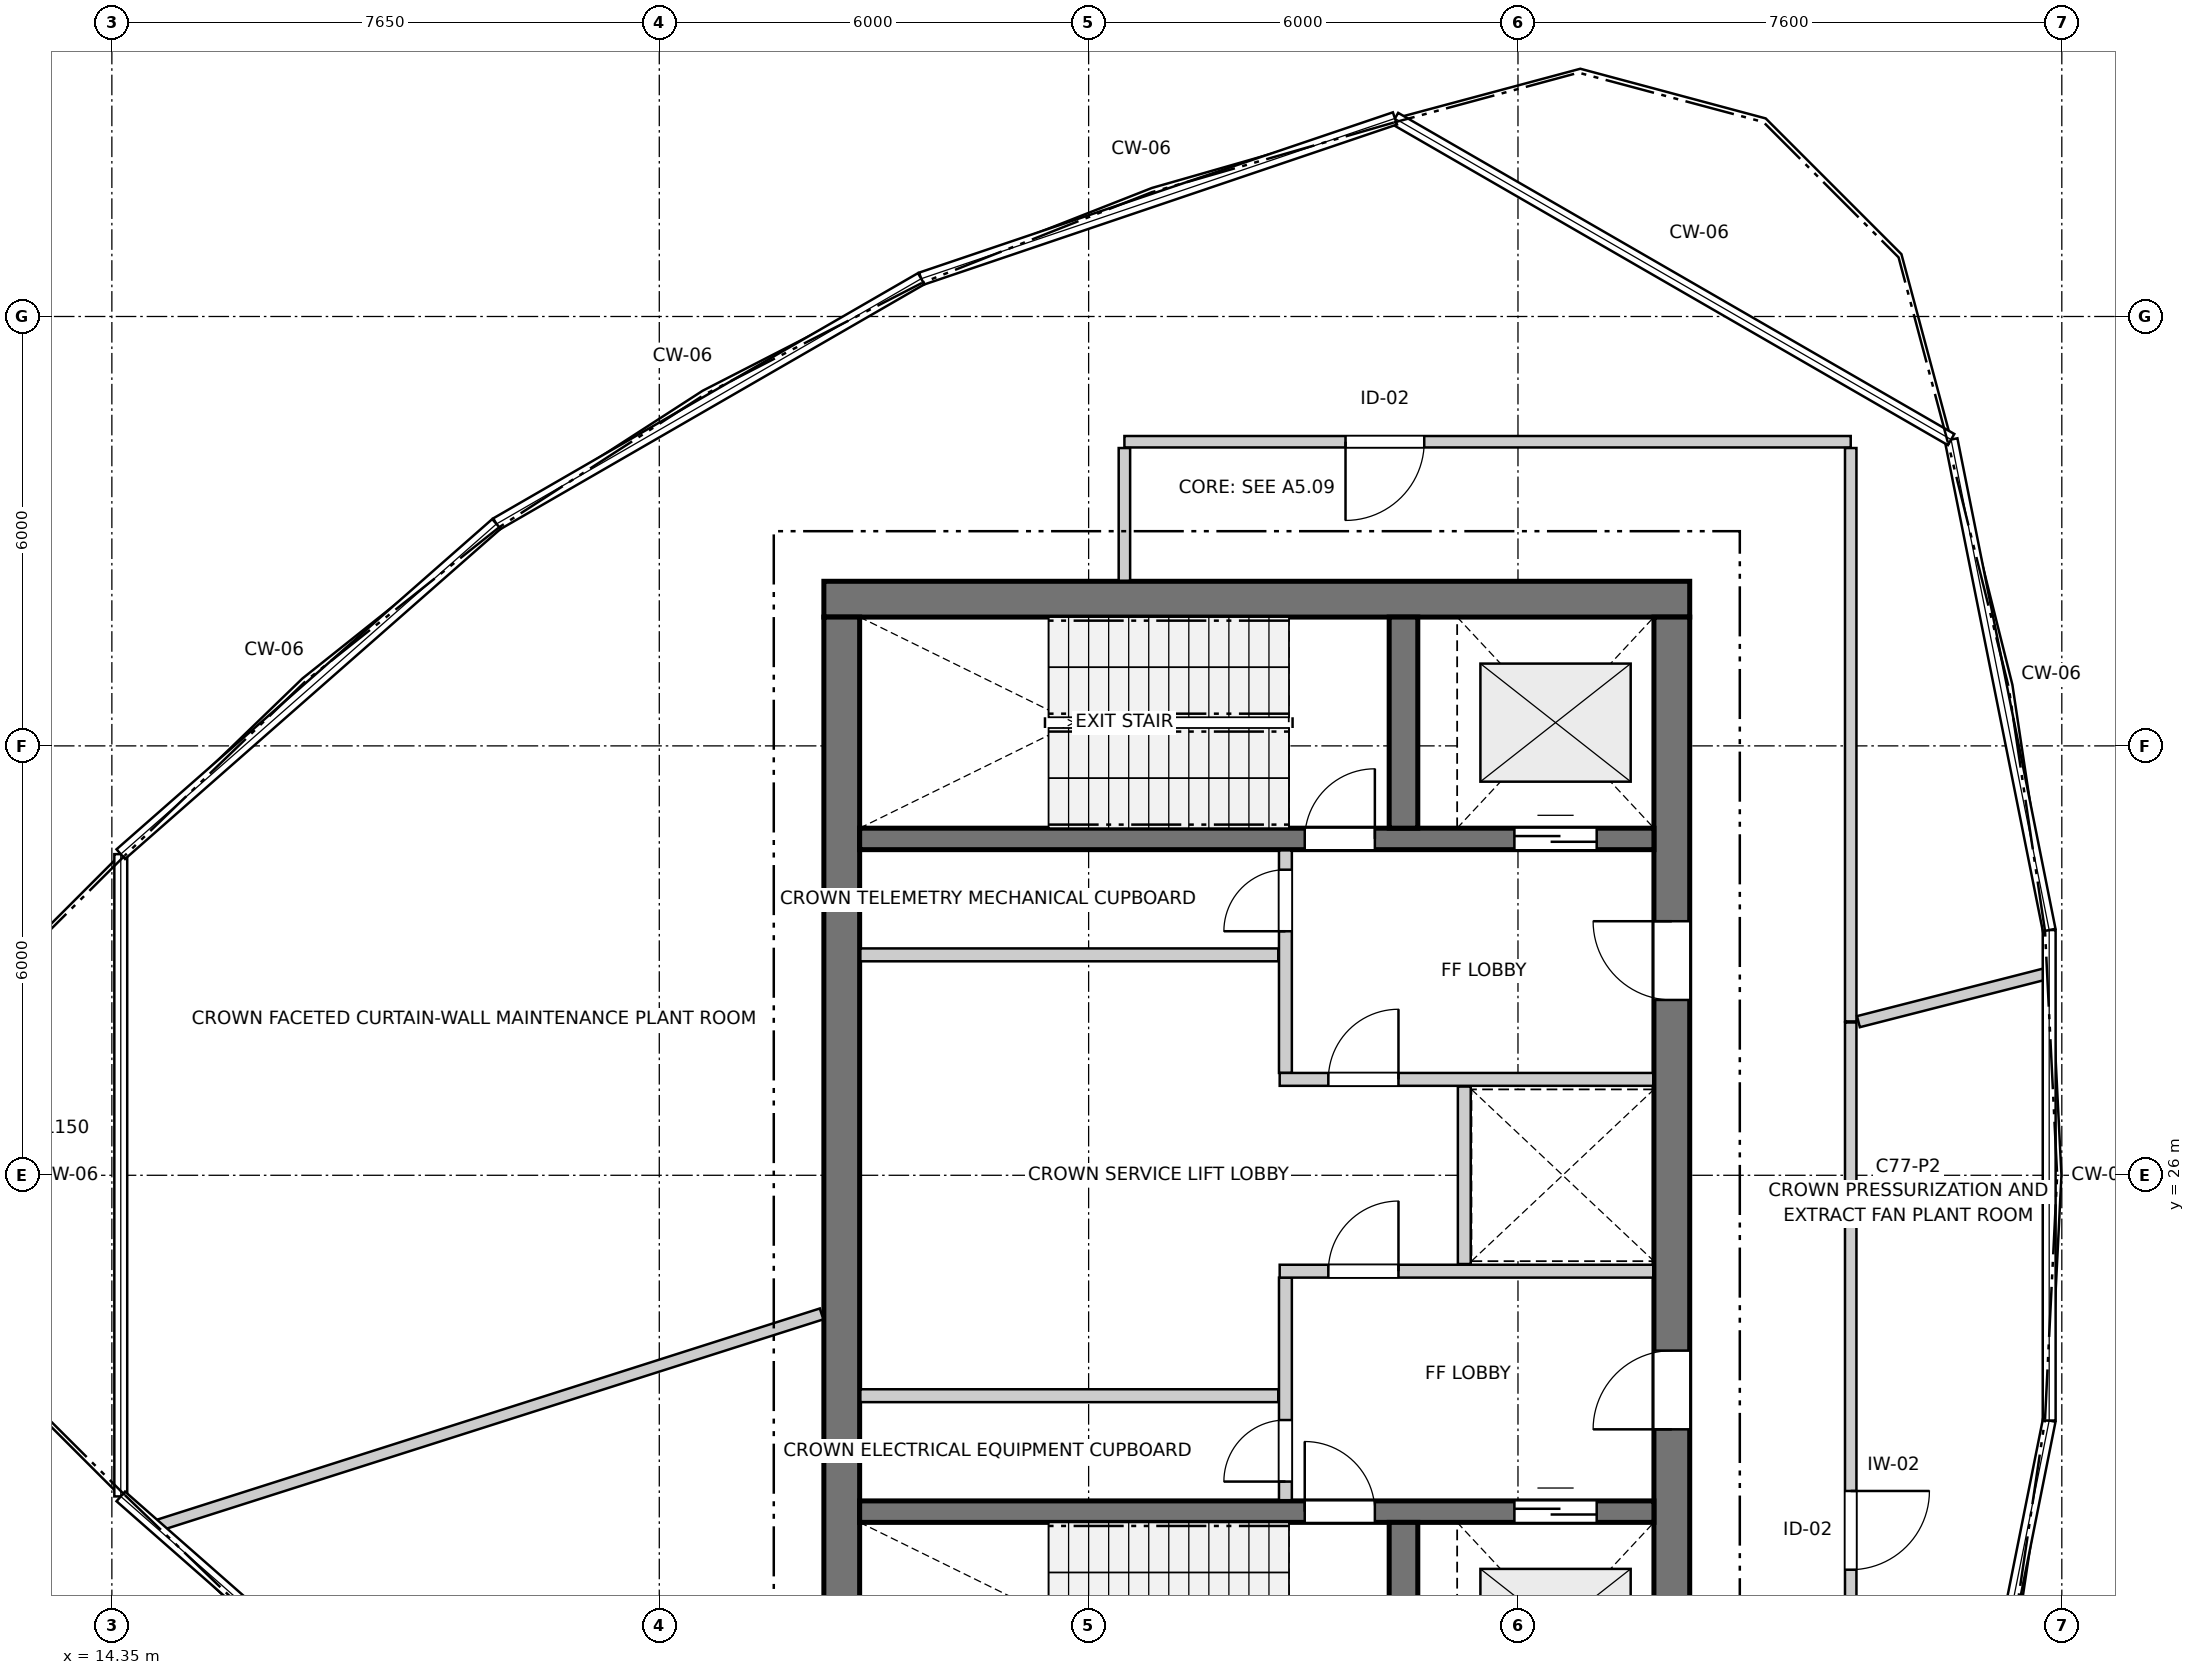
"""IFC4 building model, lengths in metres.
Left out: names, types, materials, properties, quantities, classifications, styles, units other than length and angle.
Written with IfcOpenShell. Run it as: python <this file> out.ifc"""

import sys

from ifc_helpers import new_model, si_unit, direction, frame, frame_2d, origin, place, context, subcontext, project, spatial, rectangle, extrude, source, transform, mapped, element, fill, save


model = new_model("IFC4")
c1 = context("Model", 3, precision=1e-05, world=origin(), true_north=direction((0.0, 1.0)))
c2 = subcontext(c1, "Body", "Model", "MODEL_VIEW")
j1 = project(units=[si_unit("LENGTHUNIT", "METRE"), si_unit("PLANEANGLEUNIT", "RADIAN")], contexts=[c1])
p1 = place(None, origin())
s1 = spatial("IfcSite", under=j1, at=p1, CompositionType="ELEMENT")
p2 = place(p1, origin())
s2 = spatial("IfcBuilding", under=s1, at=p2, CompositionType="ELEMENT")
p3 = place(p2, frame((0.0, 0.0, 257.5)))
s3 = spatial("IfcBuildingStorey", under=s2, at=p3, CompositionType="ELEMENT", Elevation=257.5)
p4 = place(p3, frame((36.4, 34.05, 0.0), z_axis=(0.0, 0.0, 1.0), x_axis=(-1.0, 0.0, 0.0)))
e1 = element("IfcWall", 1, at=p4, inside=s3, PredefinedType="SHEAR", context=c2, shape_type="SweptSolid", body=[
    extrude(rectangle(XDim=12.1, YDim=0.5, at=frame_2d((6.05, 0.0))), origin(), (0.0, 0.0, 1.0), 4.05),
])
p5 = place(p3, frame((24.55, 33.8, 0.0), z_axis=(0.0, 0.0, 1.0), x_axis=(0.0, -1.0, 0.0)))
e2 = element("IfcWall", 2, at=p5, inside=s3, PredefinedType="SHEAR", context=c2, shape_type="SweptSolid", body=[
    extrude(rectangle(XDim=15.6, YDim=0.5, at=frame_2d((7.8, 0.0))), origin(), (0.0, 0.0, 1.0), 4.05),
])
p6 = place(p3, frame((36.15, 18.2, 0.0), z_axis=(0.0, 0.0, 1.0), x_axis=(0.0, 1.0, 0.0)))
e3 = element("IfcWall", 3, at=p6, inside=s3, PredefinedType="SHEAR", context=c2, shape_type="SweptSolid", body=[
    extrude(rectangle(XDim=15.6, YDim=0.5, at=frame_2d((7.8, 0.0))), origin(), (0.0, 0.0, 1.0), 4.05),
])
p7 = place(p6, frame((4.25, 0.0, 0.0)))
e4 = element("IfcOpeningElement", 4, at=p7, cuts=e3, PredefinedType="OPENING", context=c2, shape_type="SweptSolid", body=[
    extrude(rectangle(XDim=1.1, YDim=2.15, at=frame_2d((0.55, 1.075))), frame((0.0, 0.26, 0.0), z_axis=(0.0, -1.0, 0.0), x_axis=(1.0, 0.0, 0.0)), (0.0, 0.0, 1.0), 0.52),
])
p8 = place(p6, frame((10.25, 0.0, 0.0)))
e5 = element("IfcOpeningElement", 5, at=p8, cuts=e3, PredefinedType="OPENING", context=c2, shape_type="SweptSolid", body=[
    extrude(rectangle(XDim=1.1, YDim=2.15, at=frame_2d((0.55, 1.075))), frame((0.0, 0.26, 0.0), z_axis=(0.0, -1.0, 0.0), x_axis=(1.0, 0.0, 0.0)), (0.0, 0.0, 1.0), 0.52),
])
p9 = place(p3, frame((24.8, 21.3, 0.0), z_axis=(0.0, 0.0, 1.0), x_axis=(1.0, 0.0, 0.0)))
e6 = element("IfcWall", 6, at=p9, inside=s3, PredefinedType="SHEAR", context=c2, shape_type="SweptSolid", body=[
    extrude(rectangle(XDim=11.1, YDim=0.3, at=frame_2d((5.55, 0.0))), origin(), (0.0, 0.0, 1.0), 4.05),
])
p10 = place(p9, frame((6.22, 0.0, 0.0)))
e7 = element("IfcOpeningElement", 7, at=p10, cuts=e6, PredefinedType="OPENING", context=c2, shape_type="SweptSolid", body=[
    extrude(rectangle(XDim=0.98, YDim=2.15, at=frame_2d((0.49, 1.075))), frame((0.0, 0.16, 0.0), z_axis=(0.0, -1.0, 0.0), x_axis=(1.0, 0.0, 0.0)), (0.0, 0.0, 1.0), 0.32),
])
p11 = place(p9, frame((9.15, 0.0, 0.0)))
e8 = element("IfcOpeningElement", 8, at=p11, cuts=e6, PredefinedType="OPENING", context=c2, shape_type="SweptSolid", body=[
    extrude(rectangle(XDim=1.15, YDim=2.15, at=frame_2d((0.575, 1.075))), frame((0.0, 0.16, 0.0), z_axis=(0.0, -1.0, 0.0), x_axis=(1.0, 0.0, 0.0)), (0.0, 0.0, 1.0), 0.32),
])
p12 = place(p3, frame((32.4, 18.2, 0.0), z_axis=(0.0, 0.0, 1.0), x_axis=(0.0, 1.0, 0.0)))
e9 = element("IfcWall", 9, at=p12, inside=s3, PredefinedType="SHEAR", context=c2, shape_type="SweptSolid", body=[
    extrude(rectangle(XDim=2.95, YDim=0.4, at=frame_2d((1.475, 0.0))), origin(), (0.0, 0.0, 1.0), 4.05),
])
p13 = place(p3, frame((24.8, 30.7, 0.0), z_axis=(0.0, 0.0, 1.0), x_axis=(1.0, 0.0, 0.0)))
e10 = element("IfcWall", 10, at=p13, inside=s3, PredefinedType="SHEAR", context=c2, shape_type="SweptSolid", body=[
    extrude(rectangle(XDim=11.1, YDim=0.3, at=frame_2d((5.55, 0.0))), origin(), (0.0, 0.0, 1.0), 4.05),
])
p14 = place(p13, frame((6.22, 0.0, 0.0)))
e11 = element("IfcOpeningElement", 11, at=p14, cuts=e10, PredefinedType="OPENING", context=c2, shape_type="SweptSolid", body=[
    extrude(rectangle(XDim=0.98, YDim=2.15, at=frame_2d((0.49, 1.075))), frame((0.0, 0.16, 0.0), z_axis=(0.0, -1.0, 0.0), x_axis=(1.0, 0.0, 0.0)), (0.0, 0.0, 1.0), 0.32),
])
p15 = place(p13, frame((9.15, 0.0, 0.0)))
e12 = element("IfcOpeningElement", 12, at=p15, cuts=e10, PredefinedType="OPENING", context=c2, shape_type="SweptSolid", body=[
    extrude(rectangle(XDim=1.15, YDim=2.15, at=frame_2d((0.575, 1.075))), frame((0.0, 0.16, 0.0), z_axis=(0.0, -1.0, 0.0), x_axis=(1.0, 0.0, 0.0)), (0.0, 0.0, 1.0), 0.32),
])
p16 = place(p3, frame((32.4, 30.85, 0.0), z_axis=(0.0, 0.0, 1.0), x_axis=(0.0, 1.0, 0.0)))
e13 = element("IfcWall", 13, at=p16, inside=s3, PredefinedType="SHEAR", context=c2, shape_type="SweptSolid", body=[
    extrude(rectangle(XDim=2.95, YDim=0.4, at=frame_2d((1.475, 0.0))), origin(), (0.0, 0.0, 1.0), 4.05),
])
p17 = place(p3, frame((30.75, 21.46, 0.0), z_axis=(0.0, 0.0, 1.0), x_axis=(0.0, 1.0, 0.0)))
e14 = element("IfcWall", 14, at=p17, inside=s3, PredefinedType="PARTITIONING", context=c2, shape_type="SweptSolid", body=[
    extrude(rectangle(XDim=3.11, YDim=0.18, at=frame_2d((1.555, 0.0))), origin(), (0.0, 0.0, 1.0), 4.05),
])
p18 = place(p17, frame((0.26, 0.0, 0.0)))
e15 = element("IfcOpeningElement", 15, at=p18, cuts=e14, PredefinedType="OPENING", context=c2, shape_type="SweptSolid", body=[
    extrude(rectangle(XDim=0.86, YDim=2.05, at=frame_2d((0.43, 1.025))), frame((0.0, 0.1, 0.0), z_axis=(0.0, -1.0, 0.0), x_axis=(1.0, 0.0, 0.0)), (0.0, 0.0, 1.0), 0.2),
])
p19 = place(p3, frame((30.67, 24.66, 0.0), z_axis=(0.0, 0.0, 1.0), x_axis=(1.0, 0.0, 0.0)))
e16 = element("IfcWall", 16, at=p19, inside=s3, PredefinedType="PARTITIONING", context=c2, shape_type="SweptSolid", body=[
    extrude(rectangle(XDim=5.22, YDim=0.18, at=frame_2d((2.61, 0.0))), origin(), (0.0, 0.0, 1.0), 4.05),
])
p20 = place(p19, frame((0.68, 0.0, 0.0)))
e17 = element("IfcOpeningElement", 17, at=p20, cuts=e16, PredefinedType="OPENING", context=c2, shape_type="SweptSolid", body=[
    extrude(rectangle(XDim=0.98, YDim=2.15, at=frame_2d((0.49, 1.075))), frame((0.0, 0.1, 0.0), z_axis=(0.0, -1.0, 0.0), x_axis=(1.0, 0.0, 0.0)), (0.0, 0.0, 1.0), 0.2),
])
p21 = place(p3, frame((30.75, 27.43, 0.0), z_axis=(0.0, 0.0, 1.0), x_axis=(0.0, 1.0, 0.0)))
e18 = element("IfcWall", 18, at=p21, inside=s3, PredefinedType="PARTITIONING", context=c2, shape_type="SweptSolid", body=[
    extrude(rectangle(XDim=3.11, YDim=0.18, at=frame_2d((1.555, 0.0))), origin(), (0.0, 0.0, 1.0), 4.05),
])
p22 = place(p21, frame((1.98, 0.0, 0.0)))
e19 = element("IfcOpeningElement", 19, at=p22, cuts=e18, PredefinedType="OPENING", context=c2, shape_type="SweptSolid", body=[
    extrude(rectangle(XDim=0.86, YDim=2.05, at=frame_2d((0.43, 1.025))), frame((0.0, 0.1, 0.0), z_axis=(0.0, -1.0, 0.0), x_axis=(1.0, 0.0, 0.0)), (0.0, 0.0, 1.0), 0.2),
])
p23 = place(p3, frame((30.67, 27.34, 0.0), z_axis=(0.0, 0.0, 1.0), x_axis=(1.0, 0.0, 0.0)))
e20 = element("IfcWall", 20, at=p23, inside=s3, PredefinedType="PARTITIONING", context=c2, shape_type="SweptSolid", body=[
    extrude(rectangle(XDim=5.22, YDim=0.18, at=frame_2d((2.61, 0.0))), origin(), (0.0, 0.0, 1.0), 4.05),
])
p24 = place(p23, frame((0.68, 0.0, 0.0)))
e21 = element("IfcOpeningElement", 21, at=p24, cuts=e20, PredefinedType="OPENING", context=c2, shape_type="SweptSolid", body=[
    extrude(rectangle(XDim=0.98, YDim=2.15, at=frame_2d((0.49, 1.075))), frame((0.0, 0.1, 0.0), z_axis=(0.0, -1.0, 0.0), x_axis=(1.0, 0.0, 0.0)), (0.0, 0.0, 1.0), 0.2),
])
p25 = place(p3, frame((33.25, 24.76, 0.0), z_axis=(0.0, 0.0, 1.0), x_axis=(0.0, 1.0, 0.0)))
e22 = element("IfcWall", 22, at=p25, inside=s3, PredefinedType="PARTITIONING", context=c2, shape_type="SweptSolid", body=[
    extrude(rectangle(XDim=2.48, YDim=0.18, at=frame_2d((1.24, 0.0))), origin(), (0.0, 0.0, 1.0), 4.05),
])
for number, where, z_axis, x_axis in (
    (23, (24.81, 22.92, 0.0), (0.0, 0.0, 1.0), (1.0, 0.0, 0.0)),
    (24, (24.81, 29.08, 0.0), (0.0, 0.0, 1.0), (1.0, 0.0, 0.0)),
):
    element("IfcWall", number, at=place(p3, frame(where, z_axis=z_axis, x_axis=x_axis)), inside=s3, PredefinedType="PARTITIONING", context=c2, shape_type="SweptSolid", body=[
        extrude(rectangle(XDim=5.84, YDim=0.18, at=frame_2d((2.92, 0.0))), origin(), (0.0, 0.0, 1.0), 4.05),
    ])
p26 = place(p3, frame((38.65, 28.135, 0.0), z_axis=(0.0, 0.0, 1.0), x_axis=(0.0, -1.0, 0.0)))
e25 = element("IfcWall", 25, at=p26, inside=s3, PredefinedType="PARTITIONING", context=c2, shape_type="SweptSolid", body=[
    extrude(rectangle(XDim=12.385, YDim=0.16, at=frame_2d((6.192, 0.0))), origin(), (0.0, 0.0, 1.0), 4.05),
])
p27 = place(p26, frame((6.546, 0.0, 0.0)))
e26 = element("IfcOpeningElement", 26, at=p27, cuts=e25, PredefinedType="OPENING", context=c2, shape_type="SweptSolid", body=[
    extrude(rectangle(XDim=1.1, YDim=2.15, at=frame_2d((0.55, 1.075))), frame((0.0, 0.09, 0.0), z_axis=(0.0, -1.0, 0.0), x_axis=(1.0, 0.0, 0.0)), (0.0, 0.0, 1.0), 0.18),
])
p28 = place(p3, frame((38.65, 36.25, 0.0), z_axis=(0.0, 0.0, 1.0), x_axis=(-1.0, 0.0, 0.0)))
e27 = element("IfcWall", 27, at=p28, inside=s3, PredefinedType="PARTITIONING", context=c2, shape_type="SweptSolid", body=[
    extrude(rectangle(XDim=10.15, YDim=0.16, at=frame_2d((5.075, 0.0))), origin(), (0.0, 0.0, 1.0), 4.05),
])
p29 = place(p28, frame((5.96, 0.0, 0.0)))
e28 = element("IfcOpeningElement", 28, at=p29, cuts=e27, PredefinedType="OPENING", context=c2, shape_type="SweptSolid", body=[
    extrude(rectangle(XDim=1.1, YDim=2.15, at=frame_2d((0.55, 1.075))), frame((0.0, 0.09, 0.0), z_axis=(0.0, -1.0, 0.0), x_axis=(1.0, 0.0, 0.0)), (0.0, 0.0, 1.0), 0.18),
])
p30 = place(p3, frame((14.979, 21.103, 0.0), z_axis=(0.0, 0.0, 1.0), x_axis=(0.952804016236, 0.303586077818, 0.0)))
e29 = element("IfcWall", 29, at=p30, inside=s3, PredefinedType="PARTITIONING", context=c2, shape_type="SweptSolid", body=[
    extrude(rectangle(XDim=9.749, YDim=0.16, at=frame_2d((4.875, 0.0))), origin(), (0.0, 0.0, 1.0), 3.318),
])
p31 = place(p3, frame((38.65, 28.15, 0.0), z_axis=(0.0, 0.0, 1.0), x_axis=(0.0, 1.0, 0.0)))
e30 = element("IfcWall", 30, at=p31, inside=s3, PredefinedType="PARTITIONING", context=c2, shape_type="SweptSolid", body=[
    extrude(rectangle(XDim=8.012, YDim=0.16, at=frame_2d((4.006, 0.0))), origin(), (0.0, 0.0, 1.0), 4.05),
])
p32 = place(p3, frame((38.758, 28.146, 0.0), z_axis=(0.0, 0.0, 1.0), x_axis=(0.96888022142, 0.247530031594, 0.0)))
e31 = element("IfcWall", 31, at=p32, inside=s3, PredefinedType="PARTITIONING", context=c2, shape_type="SweptSolid", body=[
    extrude(rectangle(XDim=2.724, YDim=0.16, at=frame_2d((1.362, 0.0))), origin(), (0.0, 0.0, 1.0), 4.05),
])
p33 = place(p3, frame((28.5, 34.308, 0.0), z_axis=(0.0, 0.0, 1.0), x_axis=(0.0, 1.0, 0.0)))
e32 = element("IfcWall", 32, at=p33, inside=s3, PredefinedType="PARTITIONING", context=c2, shape_type="SweptSolid", body=[
    extrude(rectangle(XDim=1.854, YDim=0.16, at=frame_2d((0.927, 0.0))), origin(), (0.0, 0.0, 1.0), 4.05),
])
m1 = source(origin(), c2, "Body", "SweptSolid", [
    extrude(rectangle(XDim=0.98, YDim=2.15, at=frame_2d((0.49, 1.075))), frame((0.0, 0.025, 0.0), z_axis=(0.0, -1.0, 0.0), x_axis=(1.0, 0.0, 0.0)), (0.0, 0.0, 1.0), 0.05),
])
p34 = place(p10, origin())
e33 = element("IfcDoor", 33, at=p34, inside=s3, OperationType="SINGLE_SWING_LEFT", PredefinedType="DOOR", context=c2, shape_type="MappedRepresentation", body=[
    mapped(m1, transform((0.0, 0.0, 0.0), x_axis=(1.0, 0.0, 0.0), y_axis=(0.0, 1.0, 0.0), z_axis=(0.0, 0.0, 1.0), scale=1.0)),
])
fill(e7, e33)
m2 = source(origin(), c2, "Body", "SweptSolid", [
    extrude(rectangle(XDim=1.15, YDim=2.15, at=frame_2d((0.575, 1.075))), frame((0.0, 0.025, 0.0), z_axis=(0.0, -1.0, 0.0), x_axis=(1.0, 0.0, 0.0)), (0.0, 0.0, 1.0), 0.05),
])
p35 = place(p11, origin())
e34 = element("IfcDoor", 34, at=p35, inside=s3, OperationType="DOUBLE_DOOR_SLIDING", PredefinedType="DOOR", context=c2, shape_type="MappedRepresentation", body=[
    mapped(m2, transform((0.0, 0.0, 0.0), x_axis=(1.0, 0.0, 0.0), y_axis=(0.0, 1.0, 0.0), z_axis=(0.0, 0.0, 1.0), scale=1.0)),
])
fill(e8, e34)
p36 = place(p14, origin())
e35 = element("IfcDoor", 35, at=p36, inside=s3, OperationType="SINGLE_SWING_RIGHT", PredefinedType="DOOR", context=c2, shape_type="MappedRepresentation", body=[
    mapped(m1, transform((0.0, 0.0, 0.0), x_axis=(1.0, 0.0, 0.0), y_axis=(0.0, 1.0, 0.0), z_axis=(0.0, 0.0, 1.0), scale=1.0)),
])
fill(e11, e35)
p37 = place(p15, origin())
e36 = element("IfcDoor", 36, at=p37, inside=s3, OperationType="DOUBLE_DOOR_SLIDING", PredefinedType="DOOR", context=c2, shape_type="MappedRepresentation", body=[
    mapped(m2, transform((0.0, 0.0, 0.0), x_axis=(1.0, 0.0, 0.0), y_axis=(0.0, 1.0, 0.0), z_axis=(0.0, 0.0, 1.0), scale=1.0)),
])
fill(e12, e36)
m3 = source(origin(), c2, "Body", "SweptSolid", [
    extrude(rectangle(XDim=1.1, YDim=2.15, at=frame_2d((0.55, 1.075))), frame((0.0, 0.025, 0.0), z_axis=(0.0, -1.0, 0.0), x_axis=(1.0, 0.0, 0.0)), (0.0, 0.0, 1.0), 0.05),
])
p38 = place(p7, origin())
e37 = element("IfcDoor", 37, at=p38, inside=s3, OperationType="SINGLE_SWING_LEFT", PredefinedType="DOOR", context=c2, shape_type="MappedRepresentation", body=[
    mapped(m3, transform((0.0, 0.0, 0.0), x_axis=(1.0, 0.0, 0.0), y_axis=(0.0, 1.0, 0.0), z_axis=(0.0, 0.0, 1.0), scale=1.0)),
])
fill(e4, e37)
p39 = place(p8, origin())
e38 = element("IfcDoor", 38, at=p39, inside=s3, OperationType="SINGLE_SWING_RIGHT", PredefinedType="DOOR", context=c2, shape_type="MappedRepresentation", body=[
    mapped(m3, transform((0.0, 0.0, 0.0), x_axis=(1.0, 0.0, 0.0), y_axis=(0.0, 1.0, 0.0), z_axis=(0.0, 0.0, 1.0), scale=1.0)),
])
fill(e5, e38)
m4 = source(origin(), c2, "Body", "SweptSolid", [
    extrude(rectangle(XDim=0.86, YDim=2.05, at=frame_2d((0.43, 1.025))), frame((0.0, 0.025, 0.0), z_axis=(0.0, -1.0, 0.0), x_axis=(1.0, 0.0, 0.0)), (0.0, 0.0, 1.0), 0.05),
])
p40 = place(p18, origin())
e39 = element("IfcDoor", 39, at=p40, inside=s3, OperationType="SINGLE_SWING_LEFT", PredefinedType="DOOR", context=c2, shape_type="MappedRepresentation", body=[
    mapped(m4, transform((0.0, 0.0, 0.0), x_axis=(1.0, 0.0, 0.0), y_axis=(0.0, 1.0, 0.0), z_axis=(0.0, 0.0, 1.0), scale=1.0)),
])
fill(e15, e39)
p41 = place(p20, origin())
e40 = element("IfcDoor", 40, at=p41, inside=s3, OperationType="SINGLE_SWING_RIGHT", PredefinedType="DOOR", context=c2, shape_type="MappedRepresentation", body=[
    mapped(m1, transform((0.0, 0.0, 0.0), x_axis=(1.0, 0.0, 0.0), y_axis=(0.0, 1.0, 0.0), z_axis=(0.0, 0.0, 1.0), scale=1.0)),
])
fill(e17, e40)
p42 = place(p22, origin())
e41 = element("IfcDoor", 41, at=p42, inside=s3, OperationType="SINGLE_SWING_LEFT", PredefinedType="DOOR", context=c2, shape_type="MappedRepresentation", body=[
    mapped(m4, transform((0.0, 0.0, 0.0), x_axis=(1.0, 0.0, 0.0), y_axis=(0.0, 1.0, 0.0), z_axis=(0.0, 0.0, 1.0), scale=1.0)),
])
fill(e19, e41)
p43 = place(p24, origin())
e42 = element("IfcDoor", 42, at=p43, inside=s3, OperationType="SINGLE_SWING_RIGHT", PredefinedType="DOOR", context=c2, shape_type="MappedRepresentation", body=[
    mapped(m1, transform((0.0, 0.0, 0.0), x_axis=(1.0, 0.0, 0.0), y_axis=(0.0, 1.0, 0.0), z_axis=(0.0, 0.0, 1.0), scale=1.0)),
])
fill(e21, e42)
p44 = place(p27, origin())
e43 = element("IfcDoor", 43, at=p44, inside=s3, OperationType="SINGLE_SWING_LEFT", PredefinedType="DOOR", context=c2, shape_type="MappedRepresentation", body=[
    mapped(m3, transform((0.0, 0.0, 0.0), x_axis=(1.0, 0.0, 0.0), y_axis=(0.0, 1.0, 0.0), z_axis=(0.0, 0.0, 1.0), scale=1.0)),
])
fill(e26, e43)
p45 = place(p29, origin())
e44 = element("IfcDoor", 44, at=p45, inside=s3, OperationType="SINGLE_SWING_RIGHT", PredefinedType="DOOR", context=c2, shape_type="MappedRepresentation", body=[
    mapped(m3, transform((0.0, 0.0, 0.0), x_axis=(1.0, 0.0, 0.0), y_axis=(0.0, 1.0, 0.0), z_axis=(0.0, 0.0, 1.0), scale=1.0)),
])
fill(e28, e44)
save(model, sys.argv[1])
